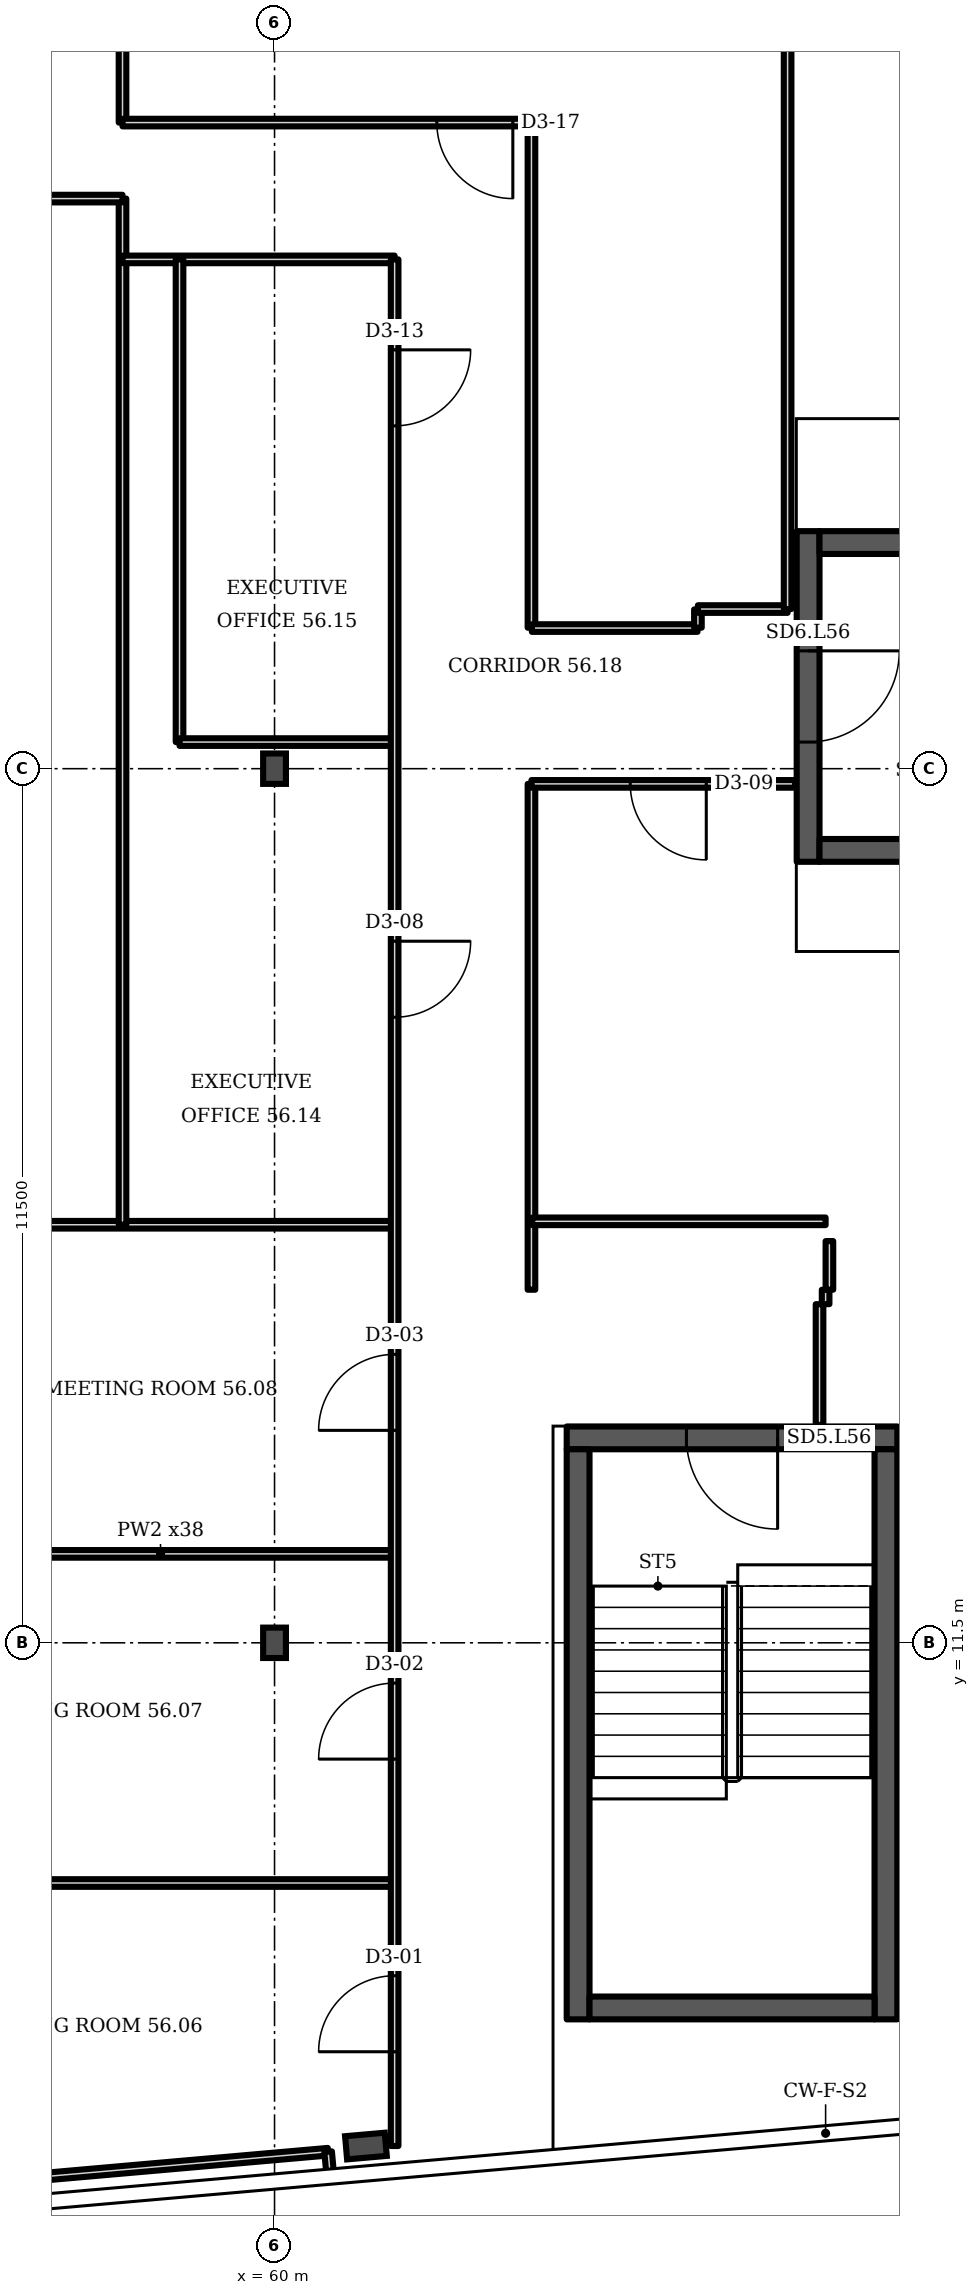
"""IFC4 building model, lengths in metres.
Left out: names, types, materials, properties, quantities, classifications, styles, units other than length and angle.
Written with IfcOpenShell. Run it as: python <this file> out.ifc"""

import sys

from ifc_helpers import new_model, si_unit, direction, frame, frame_2d, origin, origin_2d, place, context, subcontext, project, spatial, rectangle, i_section, extrude, element, fill, save


model = new_model("IFC4")
c1 = context("Model", 3, precision=1e-05, world=origin(), true_north=direction((0.0, 1.0)))
c2 = subcontext(c1, "Body", "Model", "MODEL_VIEW")
j1 = project(units=[si_unit("LENGTHUNIT", "METRE"), si_unit("PLANEANGLEUNIT", "RADIAN")], contexts=[c1])
p1 = place(None, origin())
s1 = spatial("IfcSite", under=j1, at=p1, CompositionType="ELEMENT")
p2 = place(p1, origin())
s2 = spatial("IfcBuilding", under=s1, at=p2, CompositionType="ELEMENT")
p3 = place(p2, frame((0.0, 0.0, 225.1)))
s3 = spatial("IfcBuildingStorey", under=s2, at=p3, CompositionType="ELEMENT", Elevation=225.1)
p4 = place(p3, frame((61.202, 4.879, 0.0), z_axis=(0.0, 0.0, 1.0), x_axis=(0.087156, -0.996197, 0.0)))
e1 = element("IfcColumn", 1, at=p4, inside=s3, PredefinedType="COLUMN", context=c2, shape_type="SweptSolid", body=[
    extrude(i_section(OverallWidth=0.306, OverallDepth=0.524, WebThickness=0.021, FlangeThickness=0.04, FilletRadius=0.027, at=origin_2d()), origin(), (0.0, 0.0, 1.0), 3.6),
])
for number, where, z_axis, x_axis in (
    (2, (60.0, 11.5, 0.0), (0.0, 0.0, 1.0), (1.0, 0.0, 0.0)),
    (3, (60.0, 23.0, 0.0), (0.0, 0.0, 1.0), (1.0, 0.0, 0.0)),
):
    element("IfcColumn", number, at=place(p3, frame(where, z_axis=z_axis, x_axis=x_axis)), inside=s3, PredefinedType="COLUMN", context=c2, shape_type="SweptSolid", body=[
        extrude(i_section(OverallWidth=0.3, OverallDepth=0.4, WebThickness=0.013, FlangeThickness=0.024, FilletRadius=0.027, at=origin_2d()), origin(), (0.0, 0.0, 1.0), 3.6),
    ])
p5 = place(p3, frame((63.844, 14.196, 0.0), z_axis=(0.0, 0.0, 1.0), x_axis=(1.0, 0.0, 0.0)))
e4 = element("IfcWall", 4, at=p5, inside=s3, PredefinedType="SHEAR", context=c2, shape_type="SweptSolid", body=[
    extrude(rectangle(XDim=4.35, YDim=0.3, at=frame_2d((2.175, 0.0))), origin(), (0.0, 0.0, 1.0), 3.2),
])
p6 = place(p5, frame((1.575, 0.0, 0.0)))
e5 = element("IfcOpeningElement", 5, at=p6, cuts=e4, PredefinedType="OPENING", context=c2, shape_type="SweptSolid", body=[
    extrude(rectangle(XDim=1.2, YDim=2.1, at=frame_2d((0.6, 1.05))), frame((0.0, 0.16, 0.0), z_axis=(0.0, -1.0, 0.0), x_axis=(1.0, 0.0, 0.0)), (0.0, 0.0, 1.0), 0.32),
])
p7 = place(p3, frame((67.02, 21.775, 0.0), z_axis=(0.0, 0.0, 1.0), x_axis=(0.0, 1.0, 0.0)))
e6 = element("IfcWall", 6, at=p7, inside=s3, PredefinedType="SHEAR", context=c2, shape_type="SweptSolid", body=[
    extrude(rectangle(XDim=4.35, YDim=0.3, at=frame_2d((2.175, 0.0))), origin(), (0.0, 0.0, 1.0), 3.2),
])
p8 = place(p7, frame((1.575, 0.0, 0.0)))
e7 = element("IfcOpeningElement", 7, at=p8, cuts=e6, PredefinedType="OPENING", context=c2, shape_type="SweptSolid", body=[
    extrude(rectangle(XDim=1.2, YDim=2.1, at=frame_2d((0.6, 1.05))), frame((0.0, 0.16, 0.0), z_axis=(0.0, -1.0, 0.0), x_axis=(1.0, 0.0, 0.0)), (0.0, 0.0, 1.0), 0.32),
])
p9 = place(p3, frame((39.04, 17.0, 0.0), z_axis=(0.0, 0.0, 1.0), x_axis=(1.0, 0.0, 0.0)))
e8 = element("IfcWall", 8, at=p9, inside=s3, PredefinedType="PARTITIONING", context=c2, shape_type="SweptSolid", body=[
    extrude(rectangle(XDim=22.54, YDim=0.1, at=frame_2d((11.27, 0.0))), origin(), (0.0, 0.0, 1.0), 3.2),
])
p10 = place(p3, frame((55.415, 4.34, 0.0), z_axis=(0.0, 0.0, 1.0), x_axis=(0.996159, 0.087534, 0.0)))
e9 = element("IfcWall", 9, at=p10, inside=s3, PredefinedType="PARTITIONING", context=c2, shape_type="SweptSolid", body=[
    extrude(rectangle(XDim=5.31, YDim=0.1, at=frame_2d((2.655, 0.0))), origin(), (0.0, 0.0, 1.0), 2.58),
])
for number, where, z_axis, x_axis in (
    (10, (55.42, 8.34, 0.0), (0.0, 0.0, 1.0), (1.0, 0.0, 0.0)),
    (11, (55.42, 12.67, 0.0), (0.0, 0.0, 1.0), (1.0, 0.0, 0.0)),
):
    element("IfcWall", number, at=place(p3, frame(where, z_axis=z_axis, x_axis=x_axis)), inside=s3, PredefinedType="PARTITIONING", context=c2, shape_type="SweptSolid", body=[
        extrude(rectangle(XDim=6.16, YDim=0.1, at=frame_2d((3.08, 0.0))), origin(), (0.0, 0.0, 1.0), 3.2),
    ])
p11 = place(p3, frame((58.0, 17.0, 0.0), z_axis=(0.0, 0.0, 1.0), x_axis=(0.0, 1.0, 0.0)))
e12 = element("IfcWall", 12, at=p11, inside=s3, PredefinedType="PARTITIONING", context=c2, shape_type="SweptSolid", body=[
    extrude(rectangle(XDim=13.5, YDim=0.1, at=frame_2d((6.75, 0.0))), origin(), (0.0, 0.0, 1.0), 3.2),
])
p12 = place(p3, frame((58.0, 29.7, 0.0), z_axis=(0.0, 0.0, 1.0), x_axis=(1.0, 0.0, 0.0)))
e13 = element("IfcWall", 13, at=p12, inside=s3, PredefinedType="PARTITIONING", context=c2, shape_type="SweptSolid", body=[
    extrude(rectangle(XDim=3.58, YDim=0.1, at=frame_2d((1.79, 0.0))), origin(), (0.0, 0.0, 1.0), 3.2),
])
p13 = place(p3, frame((58.0, 31.5, 0.0), z_axis=(0.0, 0.0, 1.0), x_axis=(0.0, 1.0, 0.0)))
e14 = element("IfcWall", 14, at=p13, inside=s3, PredefinedType="PARTITIONING", context=c2, shape_type="SweptSolid", body=[
    extrude(rectangle(XDim=2.48, YDim=0.1, at=frame_2d((1.24, 0.0))), origin(), (0.0, 0.0, 1.0), 3.2),
])
p14 = place(p3, frame((58.0, 31.5, 0.0), z_axis=(0.0, 0.0, 1.0), x_axis=(1.0, 0.0, 0.0)))
e15 = element("IfcWall", 15, at=p14, inside=s3, PredefinedType="PARTITIONING", context=c2, shape_type="SweptSolid", body=[
    extrude(rectangle(XDim=5.38, YDim=0.1, at=frame_2d((2.69, 0.0))), origin(), (0.0, 0.0, 1.0), 3.2),
])
p15 = place(p14, frame((4.135, 0.0, 0.0)))
e16 = element("IfcOpeningElement", 16, at=p15, cuts=e15, PredefinedType="OPENING", context=c2, shape_type="SweptSolid", body=[
    extrude(rectangle(XDim=1.0, YDim=2.1, at=frame_2d((0.5, 1.05))), frame((0.0, 0.06, 0.0), z_axis=(0.0, -1.0, 0.0), x_axis=(1.0, 0.0, 0.0)), (0.0, 0.0, 1.0), 0.12),
])
p16 = place(p3, frame((58.75, 23.35, 0.0), z_axis=(0.0, 0.0, 1.0), x_axis=(0.0, 1.0, 0.0)))
e17 = element("IfcWall", 17, at=p16, inside=s3, PredefinedType="PARTITIONING", context=c2, shape_type="SweptSolid", body=[
    extrude(rectangle(XDim=6.35, YDim=0.1, at=frame_2d((3.175, 0.0))), origin(), (0.0, 0.0, 1.0), 3.2),
])
p17 = place(p3, frame((58.75, 23.35, 0.0), z_axis=(0.0, 0.0, 1.0), x_axis=(1.0, 0.0, 0.0)))
e18 = element("IfcWall", 18, at=p17, inside=s3, PredefinedType="PARTITIONING", context=c2, shape_type="SweptSolid", body=[
    extrude(rectangle(XDim=2.83, YDim=0.1, at=frame_2d((1.415, 0.0))), origin(), (0.0, 0.0, 1.0), 3.2),
])
p18 = place(p3, frame((60.733, 4.497, 0.0), z_axis=(0.0, 0.0, 1.0), x_axis=(-0.090037, 0.995936, 0.0)))
e19 = element("IfcWall", 19, at=p18, inside=s3, PredefinedType="PARTITIONING", context=c2, shape_type="SweptSolid", body=[
    extrude(rectangle(XDim=0.309, YDim=0.1, at=frame_2d((0.155, 0.0))), origin(), (0.0, 0.0, 1.0), 3.2),
])
p19 = place(p3, frame((61.58, 4.88, 0.0), z_axis=(0.0, 0.0, 1.0), x_axis=(0.0, 1.0, 0.0)))
e20 = element("IfcWall", 20, at=p19, inside=s3, PredefinedType="PARTITIONING", context=c2, shape_type="SweptSolid", body=[
    extrude(rectangle(XDim=24.82, YDim=0.1, at=frame_2d((12.41, 0.0))), origin(), (0.0, 0.0, 1.0), 3.2),
])
p20 = place(p19, frame((1.24, 0.0, 0.0)))
e21 = element("IfcOpeningElement", 21, at=p20, cuts=e20, PredefinedType="OPENING", context=c2, shape_type="SweptSolid", body=[
    extrude(rectangle(XDim=1.0, YDim=2.1, at=frame_2d((0.5, 1.05))), frame((0.0, 0.06, 0.0), z_axis=(0.0, -1.0, 0.0), x_axis=(1.0, 0.0, 0.0)), (0.0, 0.0, 1.0), 0.12),
])
p21 = place(p19, frame((5.09, 0.0, 0.0)))
e22 = element("IfcOpeningElement", 22, at=p21, cuts=e20, PredefinedType="OPENING", context=c2, shape_type="SweptSolid", body=[
    extrude(rectangle(XDim=1.0, YDim=2.1, at=frame_2d((0.5, 1.05))), frame((0.0, 0.06, 0.0), z_axis=(0.0, -1.0, 0.0), x_axis=(1.0, 0.0, 0.0)), (0.0, 0.0, 1.0), 0.12),
])
p22 = place(p19, frame((9.415, 0.0, 0.0)))
e23 = element("IfcOpeningElement", 23, at=p22, cuts=e20, PredefinedType="OPENING", context=c2, shape_type="SweptSolid", body=[
    extrude(rectangle(XDim=1.0, YDim=2.1, at=frame_2d((0.5, 1.05))), frame((0.0, 0.06, 0.0), z_axis=(0.0, -1.0, 0.0), x_axis=(1.0, 0.0, 0.0)), (0.0, 0.0, 1.0), 0.12),
])
p23 = place(p19, frame((14.85, 0.0, 0.0)))
e24 = element("IfcOpeningElement", 24, at=p23, cuts=e20, PredefinedType="OPENING", context=c2, shape_type="SweptSolid", body=[
    extrude(rectangle(XDim=1.0, YDim=2.1, at=frame_2d((0.5, 1.05))), frame((0.0, 0.06, 0.0), z_axis=(0.0, -1.0, 0.0), x_axis=(1.0, 0.0, 0.0)), (0.0, 0.0, 1.0), 0.12),
])
p24 = place(p19, frame((22.63, 0.0, 0.0)))
e25 = element("IfcOpeningElement", 25, at=p24, cuts=e20, PredefinedType="OPENING", context=c2, shape_type="SweptSolid", body=[
    extrude(rectangle(XDim=1.0, YDim=2.1, at=frame_2d((0.5, 1.05))), frame((0.0, 0.06, 0.0), z_axis=(0.0, -1.0, 0.0), x_axis=(1.0, 0.0, 0.0)), (0.0, 0.0, 1.0), 0.12),
])
p25 = place(p3, frame((63.38, 16.145, 0.0), z_axis=(0.0, 0.0, 1.0), x_axis=(0.0, 1.0, 0.0)))
e26 = element("IfcWall", 26, at=p25, inside=s3, PredefinedType="PARTITIONING", context=c2, shape_type="SweptSolid", body=[
    extrude(rectangle(XDim=6.655, YDim=0.1, at=frame_2d((3.328, 0.0))), origin(), (0.0, 0.0, 1.0), 3.2),
])
p26 = place(p3, frame((63.38, 22.8, 0.0), z_axis=(0.0, 0.0, 1.0), x_axis=(1.0, 0.0, 0.0)))
e27 = element("IfcWall", 27, at=p26, inside=s3, PredefinedType="PARTITIONING", context=c2, shape_type="SweptSolid", body=[
    extrude(rectangle(XDim=3.47, YDim=0.1, at=frame_2d((1.735, 0.0))), origin(), (0.0, 0.0, 1.0), 3.2),
])
p27 = place(p26, frame((1.3, 0.0, 0.0)))
e28 = element("IfcOpeningElement", 28, at=p27, cuts=e27, PredefinedType="OPENING", context=c2, shape_type="SweptSolid", body=[
    extrude(rectangle(XDim=1.0, YDim=2.1, at=frame_2d((0.5, 1.05))), frame((0.0, 0.06, 0.0), z_axis=(0.0, -1.0, 0.0), x_axis=(1.0, 0.0, 0.0)), (0.0, 0.0, 1.0), 0.12),
])
p28 = place(p3, frame((63.38, 24.855, 0.0), z_axis=(0.0, 0.0, 1.0), x_axis=(0.0, 1.0, 0.0)))
e29 = element("IfcWall", 29, at=p28, inside=s3, PredefinedType="PARTITIONING", context=c2, shape_type="SweptSolid", body=[
    extrude(rectangle(XDim=6.645, YDim=0.1, at=frame_2d((3.323, 0.0))), origin(), (0.0, 0.0, 1.0), 3.2),
])
p29 = place(p3, frame((63.385, 24.85, 0.0), z_axis=(0.0, 0.0, 1.0), x_axis=(1.0, 0.0, 0.0)))
e30 = element("IfcWall", 30, at=p29, inside=s3, PredefinedType="PARTITIONING", context=c2, shape_type="SweptSolid", body=[
    extrude(rectangle(XDim=2.18, YDim=0.1, at=frame_2d((1.09, 0.0))), origin(), (0.0, 0.0, 1.0), 3.2),
])
p30 = place(p3, frame((63.39, 17.045, 0.0), z_axis=(0.0, 0.0, 1.0), x_axis=(1.0, 0.0, 0.0)))
e31 = element("IfcWall", 31, at=p30, inside=s3, PredefinedType="PARTITIONING", context=c2, shape_type="SweptSolid", body=[
    extrude(rectangle(XDim=3.86, YDim=0.1, at=frame_2d((1.93, 0.0))), origin(), (0.0, 0.0, 1.0), 3.2),
])
p31 = place(p3, frame((65.57, 24.855, 0.0), z_axis=(0.0, 0.0, 1.0), x_axis=(0.0, 1.0, 0.0)))
e32 = element("IfcWall", 32, at=p31, inside=s3, PredefinedType="PARTITIONING", context=c2, shape_type="SweptSolid", body=[
    extrude(rectangle(XDim=0.24, YDim=0.1, at=frame_2d((0.12, 0.0))), origin(), (0.0, 0.0, 1.0), 3.2),
])
p32 = place(p3, frame((65.57, 25.1, 0.0), z_axis=(0.0, 0.0, 1.0), x_axis=(1.0, 0.0, 0.0)))
e33 = element("IfcWall", 33, at=p32, inside=s3, PredefinedType="PARTITIONING", context=c2, shape_type="SweptSolid", body=[
    extrude(rectangle(XDim=1.18, YDim=0.1, at=frame_2d((0.59, 0.0))), origin(), (0.0, 0.0, 1.0), 3.2),
])
p33 = place(p3, frame((66.75, 25.1, 0.0), z_axis=(0.0, 0.0, 1.0), x_axis=(0.0, 1.0, 0.0)))
e34 = element("IfcWall", 34, at=p33, inside=s3, PredefinedType="PARTITIONING", context=c2, shape_type="SweptSolid", body=[
    extrude(rectangle(XDim=16.88, YDim=0.1, at=frame_2d((8.44, 0.0))), origin(), (0.0, 0.0, 1.0), 3.2),
])
p34 = place(p3, frame((67.17, 14.366, 0.0), z_axis=(0.0, 0.0, 1.0), x_axis=(0.0, 1.0, 0.0)))
e35 = element("IfcWall", 35, at=p34, inside=s3, PredefinedType="PARTITIONING", context=c2, shape_type="SweptSolid", body=[
    extrude(rectangle(XDim=1.589, YDim=0.1, at=frame_2d((0.794, 0.0))), origin(), (0.0, 0.0, 1.0), 3.2),
])
p35 = place(p3, frame((67.25, 15.955, 0.0), z_axis=(0.0, 0.0, 1.0), x_axis=(0.0, 1.0, 0.0)))
e36 = element("IfcWall", 36, at=p35, inside=s3, PredefinedType="PARTITIONING", context=c2, shape_type="SweptSolid", body=[
    extrude(rectangle(XDim=0.19, YDim=0.1, at=frame_2d((0.095, 0.0))), origin(), (0.0, 0.0, 1.0), 3.2),
])
p36 = place(p3, frame((67.3, 16.145, 0.0), z_axis=(0.0, 0.0, 1.0), x_axis=(0.0, 1.0, 0.0)))
e37 = element("IfcWall", 37, at=p36, inside=s3, PredefinedType="PARTITIONING", context=c2, shape_type="SweptSolid", body=[
    extrude(rectangle(XDim=0.64, YDim=0.1, at=frame_2d((0.32, 0.0))), origin(), (0.0, 0.0, 1.0), 3.2),
])
p37 = place(p3, frame((44.15, 30.5, 0.0), z_axis=(0.0, 0.0, 1.0), x_axis=(1.0, 0.0, 0.0)))
e38 = element("IfcWall", 38, at=p37, inside=s3, PredefinedType="PARTITIONING", context=c2, shape_type="SweptSolid", body=[
    extrude(rectangle(XDim=13.85, YDim=0.1, at=frame_2d((6.925, 0.0))), origin(), (0.0, 0.0, 1.0), 3.2),
])
p38 = place(p37, frame((6.77, 0.0, 0.0)))
e39 = element("IfcOpeningElement", 39, at=p38, cuts=e38, PredefinedType="OPENING", context=c2, shape_type="SweptSolid", body=[
    extrude(rectangle(XDim=1.0, YDim=2.1, at=frame_2d((0.5, 1.05))), frame((0.0, 0.06, 0.0), z_axis=(0.0, -1.0, 0.0), x_axis=(1.0, 0.0, 0.0)), (0.0, 0.0, 1.0), 0.12),
])
for number, where, z_axis, x_axis in (
    (40, (63.994, 6.546, 0.0), (0.0, 0.0, 1.0), (0.0, 1.0, 0.0)),
    (41, (68.044, 6.546, 0.0), (0.0, 0.0, 1.0), (0.0, 1.0, 0.0)),
):
    element("IfcWall", number, at=place(p3, frame(where, z_axis=z_axis, x_axis=x_axis)), inside=s3, PredefinedType="SHEAR", context=c2, shape_type="SweptSolid", body=[
        extrude(rectangle(XDim=7.5, YDim=0.3, at=frame_2d((3.75, 0.0))), origin(), (0.0, 0.0, 1.0), 3.2),
    ])
p39 = place(p3, frame((64.144, 6.696, 0.0), z_axis=(0.0, 0.0, 1.0), x_axis=(1.0, 0.0, 0.0)))
e42 = element("IfcWall", 42, at=p39, inside=s3, PredefinedType="SHEAR", context=c2, shape_type="SweptSolid", body=[
    extrude(rectangle(XDim=3.75, YDim=0.3, at=frame_2d((1.875, 0.0))), origin(), (0.0, 0.0, 1.0), 3.2),
])
for number, where, z_axis, x_axis in (
    (43, (67.17, 21.925, 0.0), (0.0, 0.0, 1.0), (1.0, 0.0, 0.0)),
    (44, (67.17, 25.975, 0.0), (0.0, 0.0, 1.0), (1.0, 0.0, 0.0)),
):
    element("IfcWall", number, at=place(p3, frame(where, z_axis=z_axis, x_axis=x_axis)), inside=s3, PredefinedType="SHEAR", context=c2, shape_type="SweptSolid", body=[
        extrude(rectangle(XDim=7.5, YDim=0.3, at=frame_2d((3.75, 0.0))), origin(), (0.0, 0.0, 1.0), 3.2),
    ])
p40 = place(p6, origin())
e45 = element("IfcDoor", 45, at=p40, inside=s3, OperationType="SINGLE_SWING_RIGHT", PredefinedType="DOOR", context=c2, shape_type="SweptSolid", body=[
    extrude(rectangle(XDim=1.2, YDim=2.1, at=frame_2d((0.6, 1.05))), frame((0.0, 0.025, 0.0), z_axis=(0.0, -1.0, 0.0), x_axis=(1.0, 0.0, 0.0)), (0.0, 0.0, 1.0), 0.05),
])
fill(e5, e45)
p41 = place(p8, origin())
e46 = element("IfcDoor", 46, at=p41, inside=s3, OperationType="SINGLE_SWING_RIGHT", PredefinedType="DOOR", context=c2, shape_type="SweptSolid", body=[
    extrude(rectangle(XDim=1.2, YDim=2.1, at=frame_2d((0.6, 1.05))), frame((0.0, 0.025, 0.0), z_axis=(0.0, -1.0, 0.0), x_axis=(1.0, 0.0, 0.0)), (0.0, 0.0, 1.0), 0.05),
])
fill(e7, e46)
p42 = place(p20, origin())
e47 = element("IfcDoor", 47, at=p42, inside=s3, OperationType="SINGLE_SWING_LEFT", PredefinedType="DOOR", context=c2, shape_type="SweptSolid", body=[
    extrude(rectangle(XDim=1.0, YDim=2.1, at=frame_2d((0.5, 1.05))), frame((0.0, 0.025, 0.0), z_axis=(0.0, -1.0, 0.0), x_axis=(1.0, 0.0, 0.0)), (0.0, 0.0, 1.0), 0.05),
])
fill(e21, e47)
p43 = place(p21, origin())
e48 = element("IfcDoor", 48, at=p43, inside=s3, OperationType="SINGLE_SWING_LEFT", PredefinedType="DOOR", context=c2, shape_type="SweptSolid", body=[
    extrude(rectangle(XDim=1.0, YDim=2.1, at=frame_2d((0.5, 1.05))), frame((0.0, 0.025, 0.0), z_axis=(0.0, -1.0, 0.0), x_axis=(1.0, 0.0, 0.0)), (0.0, 0.0, 1.0), 0.05),
])
fill(e22, e48)
p44 = place(p22, origin())
e49 = element("IfcDoor", 49, at=p44, inside=s3, OperationType="SINGLE_SWING_LEFT", PredefinedType="DOOR", context=c2, shape_type="SweptSolid", body=[
    extrude(rectangle(XDim=1.0, YDim=2.1, at=frame_2d((0.5, 1.05))), frame((0.0, 0.025, 0.0), z_axis=(0.0, -1.0, 0.0), x_axis=(1.0, 0.0, 0.0)), (0.0, 0.0, 1.0), 0.05),
])
fill(e23, e49)
p45 = place(p23, origin())
e50 = element("IfcDoor", 50, at=p45, inside=s3, OperationType="SINGLE_SWING_RIGHT", PredefinedType="DOOR", context=c2, shape_type="SweptSolid", body=[
    extrude(rectangle(XDim=1.0, YDim=2.1, at=frame_2d((0.5, 1.05))), frame((0.0, 0.025, 0.0), z_axis=(0.0, -1.0, 0.0), x_axis=(1.0, 0.0, 0.0)), (0.0, 0.0, 1.0), 0.05),
])
fill(e24, e50)
p46 = place(p27, origin())
e51 = element("IfcDoor", 51, at=p46, inside=s3, OperationType="SINGLE_SWING_RIGHT", PredefinedType="DOOR", context=c2, shape_type="SweptSolid", body=[
    extrude(rectangle(XDim=1.0, YDim=2.1, at=frame_2d((0.5, 1.05))), frame((0.0, 0.025, 0.0), z_axis=(0.0, -1.0, 0.0), x_axis=(1.0, 0.0, 0.0)), (0.0, 0.0, 1.0), 0.05),
])
fill(e28, e51)
p47 = place(p24, origin())
e52 = element("IfcDoor", 52, at=p47, inside=s3, OperationType="SINGLE_SWING_RIGHT", PredefinedType="DOOR", context=c2, shape_type="SweptSolid", body=[
    extrude(rectangle(XDim=1.0, YDim=2.1, at=frame_2d((0.5, 1.05))), frame((0.0, 0.025, 0.0), z_axis=(0.0, -1.0, 0.0), x_axis=(1.0, 0.0, 0.0)), (0.0, 0.0, 1.0), 0.05),
])
fill(e25, e52)
p48 = place(p15, origin())
e53 = element("IfcDoor", 53, at=p48, inside=s3, OperationType="SINGLE_SWING_RIGHT", PredefinedType="DOOR", context=c2, shape_type="SweptSolid", body=[
    extrude(rectangle(XDim=1.0, YDim=2.1, at=frame_2d((0.5, 1.05))), frame((0.0, 0.025, 0.0), z_axis=(0.0, -1.0, 0.0), x_axis=(1.0, 0.0, 0.0)), (0.0, 0.0, 1.0), 0.05),
])
fill(e16, e53)
save(model, sys.argv[1])
